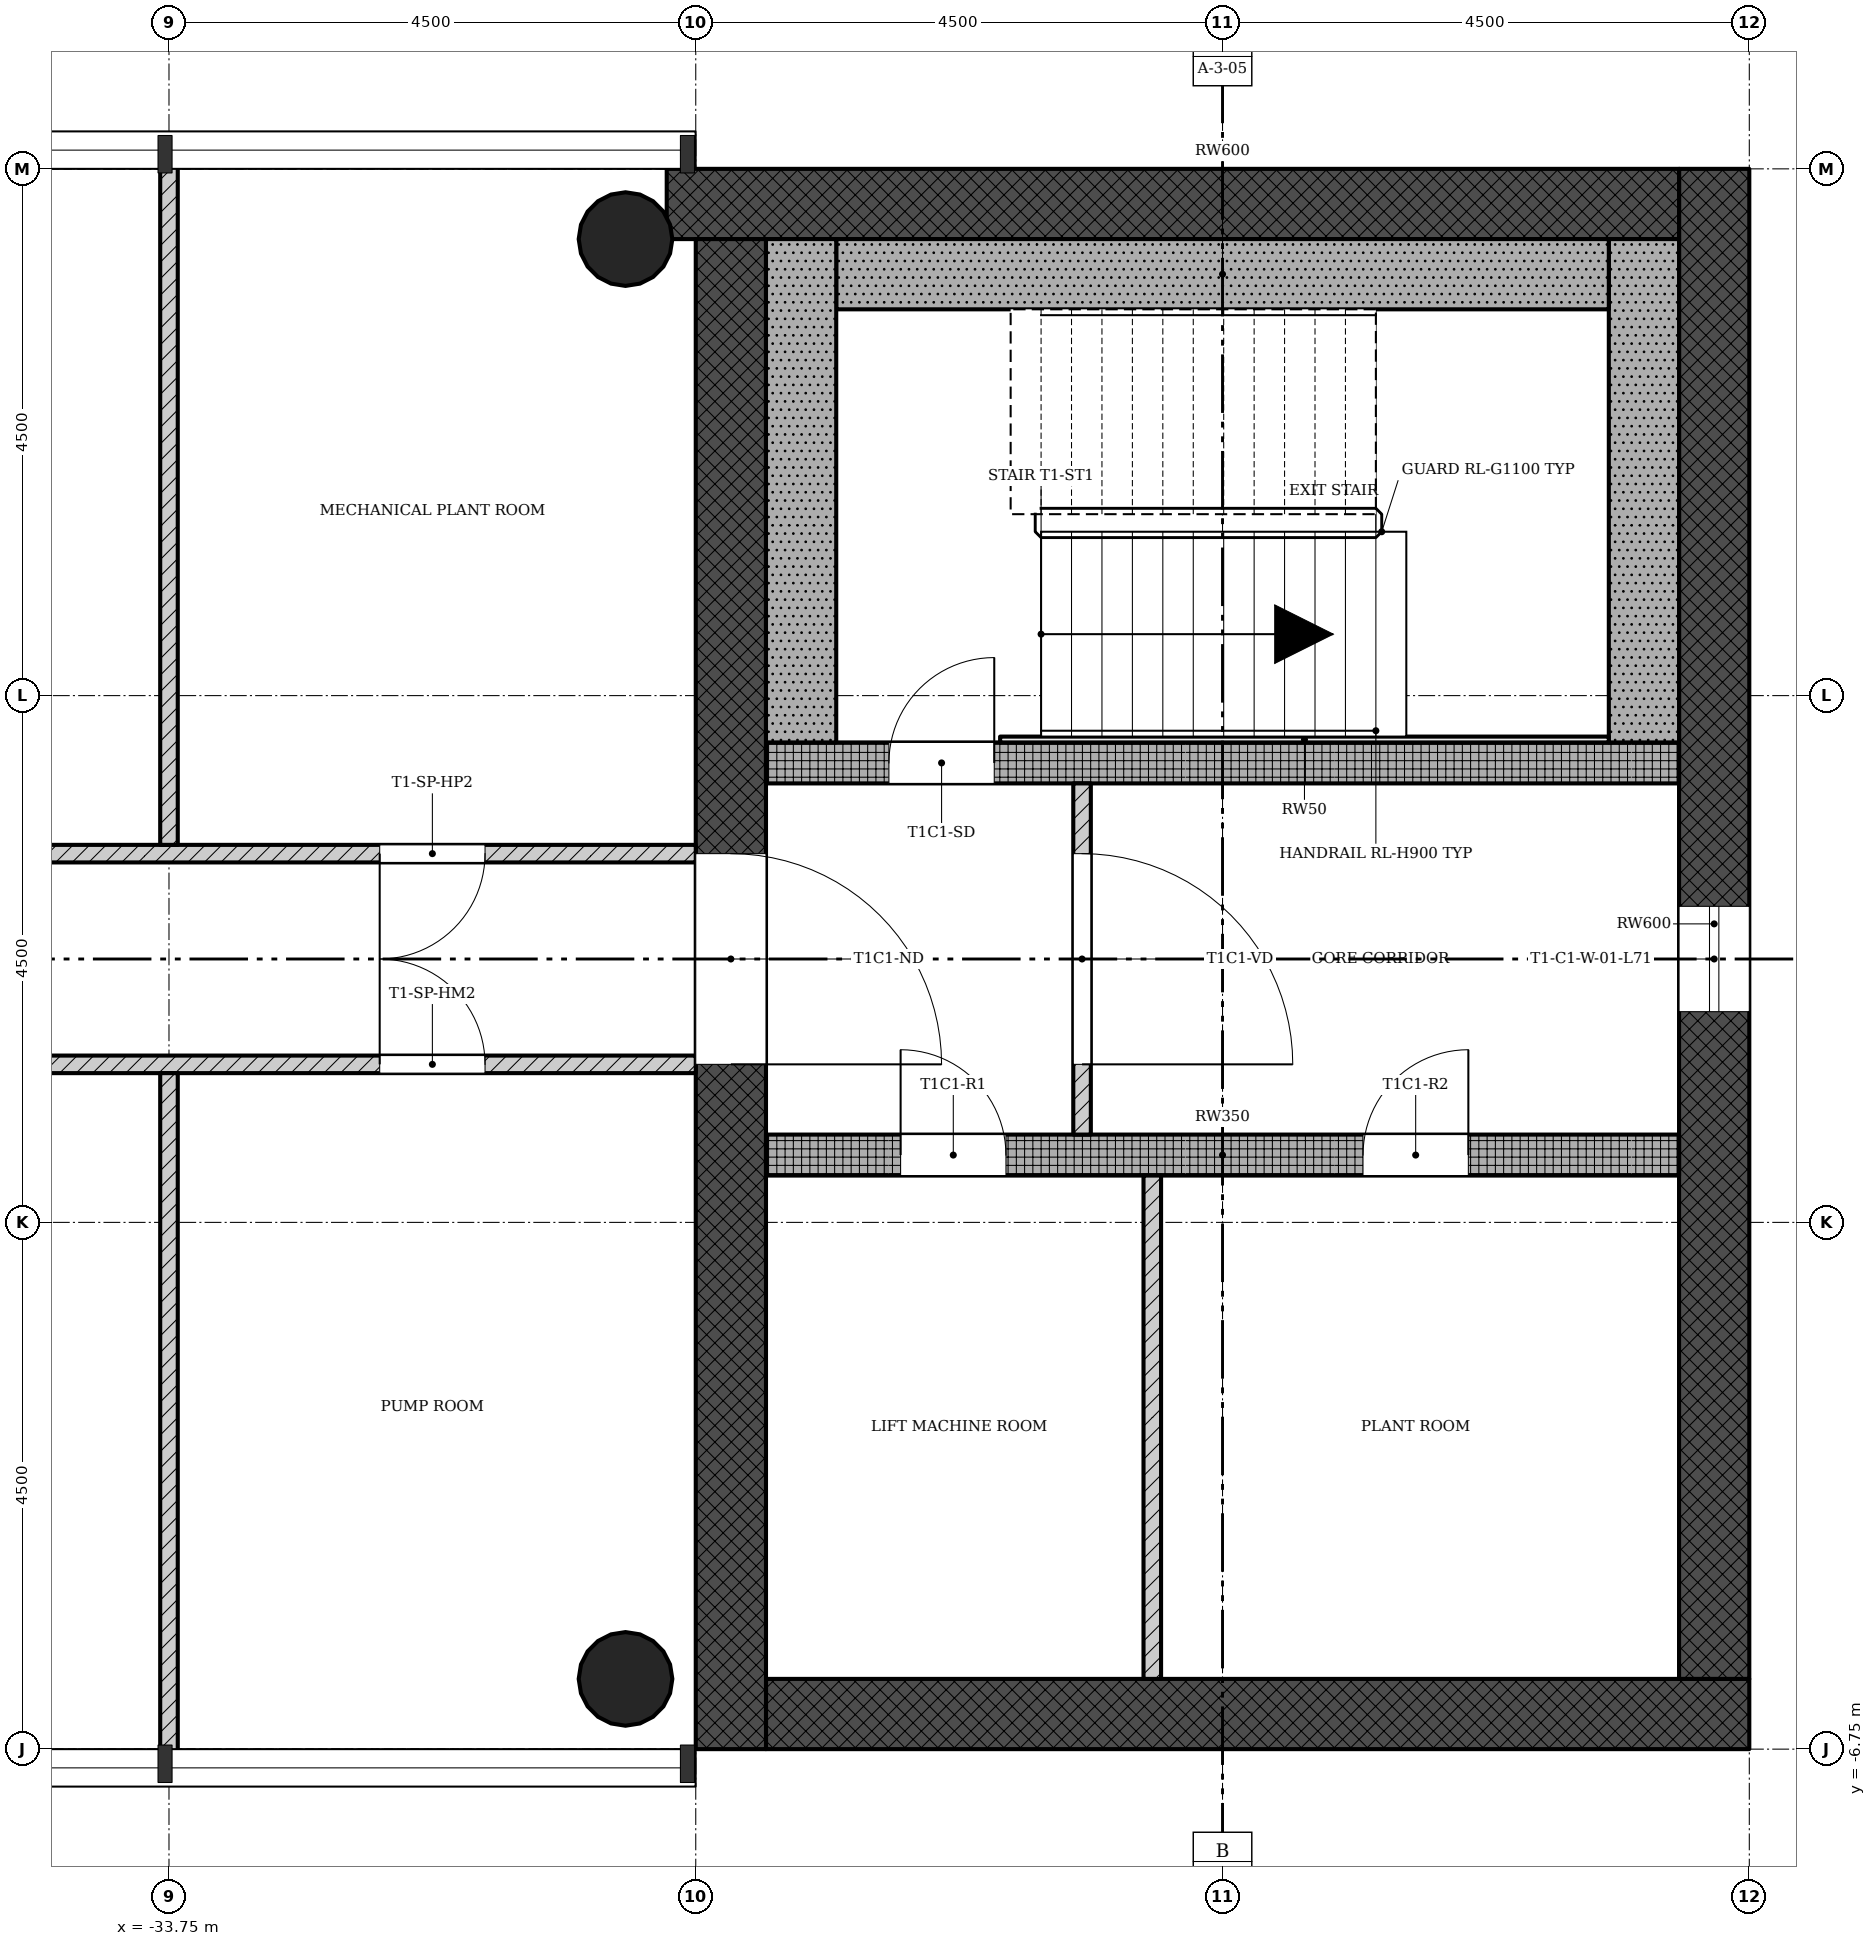
"""IFC4 building model, lengths in metres.
Left out: names, types, materials, properties, quantities, classifications, styles, units other than length and angle.
Written with IfcOpenShell. Run it as: python <this file> out.ifc"""

import sys

from ifc_helpers import new_model, si_unit, direction, frame, frame_2d, origin, origin_2d, place, context, subcontext, project, spatial, rectangle, hollow_circle, extrude, element, fill, save


model = new_model("IFC4")
c1 = context("Model", 3, precision=1e-05, world=origin(), true_north=direction((0.0, 1.0)))
c2 = subcontext(c1, "Body", "Model", "MODEL_VIEW")
j1 = project(units=[si_unit("LENGTHUNIT", "METRE"), si_unit("PLANEANGLEUNIT", "RADIAN")], contexts=[c1])
p1 = place(None, origin())
s1 = spatial("IfcSite", under=j1, at=p1, CompositionType="ELEMENT")
p2 = place(p1, origin())
s2 = spatial("IfcBuilding", under=s1, at=p2, CompositionType="ELEMENT")
p3 = place(p2, frame((0.0, 0.0, 260.4)))
s3 = spatial("IfcBuildingStorey", under=s2, at=p3, CompositionType="ELEMENT", Elevation=260.4)
p4 = place(p3, frame((-28.65, -6.45, 0.0), z_axis=(0.0, 0.0, 1.0), x_axis=(1.0, 0.0, 0.0)))
e1 = element("IfcWall", 1, at=p4, inside=s3, PredefinedType="SHEAR", context=c2, shape_type="SweptSolid", body=[
    extrude(rectangle(XDim=8.4, YDim=0.6, at=frame_2d((4.2, 0.0))), origin(), (0.0, 0.0, 1.0), 4.5),
])
p5 = place(p3, frame((-20.55, -6.15, 0.0), z_axis=(0.0, 0.0, 1.0), x_axis=(0.0, 1.0, 0.0)))
e2 = element("IfcWall", 2, at=p5, inside=s3, PredefinedType="SHEAR", context=c2, shape_type="SweptSolid", body=[
    extrude(rectangle(XDim=12.9, YDim=0.6, at=frame_2d((6.45, 0.0))), origin(), (0.0, 0.0, 1.0), 4.5),
])
p6 = place(p5, frame((5.7, 0.0, 0.45)))
e3 = element("IfcOpeningElement", 3, at=p6, cuts=e2, PredefinedType="OPENING", context=c2, shape_type="SweptSolid", body=[
    extrude(rectangle(XDim=0.9, YDim=2.4, at=frame_2d((0.45, 1.2))), frame((0.0, 0.31, 0.0), z_axis=(0.0, -1.0, 0.0), x_axis=(1.0, 0.0, 0.0)), (0.0, 0.0, 1.0), 0.62),
])
p7 = place(p3, frame((-20.85, 6.45, 0.0), z_axis=(0.0, 0.0, 1.0), x_axis=(-1.0, 0.0, 0.0)))
e4 = element("IfcWall", 4, at=p7, inside=s3, PredefinedType="SHEAR", context=c2, shape_type="SweptSolid", body=[
    extrude(rectangle(XDim=8.648, YDim=0.6, at=frame_2d((4.324, 0.0))), origin(), (0.0, 0.0, 1.0), 4.5),
])
p8 = place(p3, frame((-28.95, 6.15, 0.0), z_axis=(0.0, 0.0, 1.0), x_axis=(0.0, -1.0, 0.0)))
e5 = element("IfcWall", 5, at=p8, inside=s3, PredefinedType="SHEAR", context=c2, shape_type="SweptSolid", body=[
    extrude(rectangle(XDim=12.9, YDim=0.6, at=frame_2d((6.45, 0.0))), origin(), (0.0, 0.0, 1.0), 4.5),
])
p9 = place(p8, frame((5.25, 0.0, 0.0)))
e6 = element("IfcOpeningElement", 6, at=p9, cuts=e5, PredefinedType="OPENING", context=c2, shape_type="SweptSolid", body=[
    extrude(rectangle(XDim=1.8, YDim=2.1, at=frame_2d((0.9, 1.05))), frame((0.0, 0.31, 0.0), z_axis=(0.0, -1.0, 0.0), x_axis=(1.0, 0.0, 0.0)), (0.0, 0.0, 1.0), 0.62),
])
p10 = place(p3, frame((-28.65, -1.675, 0.0), z_axis=(0.0, 0.0, 1.0), x_axis=(1.0, 0.0, 0.0)))
e7 = element("IfcWall", 7, at=p10, inside=s3, PredefinedType="SHEAR", context=c2, shape_type="SweptSolid", body=[
    extrude(rectangle(XDim=7.8, YDim=0.35, at=frame_2d((3.9, 0.0))), origin(), (0.0, 0.0, 1.0), 4.5),
])
p11 = place(p10, frame((1.15, 0.0, 0.0)))
e8 = element("IfcOpeningElement", 8, at=p11, cuts=e7, PredefinedType="OPENING", context=c2, shape_type="SweptSolid", body=[
    extrude(rectangle(XDim=0.9, YDim=2.1, at=frame_2d((0.45, 1.05))), frame((0.0, 0.185, 0.0), z_axis=(0.0, -1.0, 0.0), x_axis=(1.0, 0.0, 0.0)), (0.0, 0.0, 1.0), 0.37),
])
p12 = place(p10, frame((5.1, 0.0, 0.0)))
e9 = element("IfcOpeningElement", 9, at=p12, cuts=e7, PredefinedType="OPENING", context=c2, shape_type="SweptSolid", body=[
    extrude(rectangle(XDim=0.9, YDim=2.1, at=frame_2d((0.45, 1.05))), frame((0.0, 0.185, 0.0), z_axis=(0.0, -1.0, 0.0), x_axis=(1.0, 0.0, 0.0)), (0.0, 0.0, 1.0), 0.37),
])
p13 = place(p3, frame((-28.65, 1.675, 0.0), z_axis=(0.0, 0.0, 1.0), x_axis=(1.0, 0.0, 0.0)))
e10 = element("IfcWall", 10, at=p13, inside=s3, PredefinedType="SHEAR", context=c2, shape_type="SweptSolid", body=[
    extrude(rectangle(XDim=7.8, YDim=0.35, at=frame_2d((3.9, 0.0))), origin(), (0.0, 0.0, 1.0), 4.5),
])
p14 = place(p13, frame((1.05, 0.0, 0.0)))
e11 = element("IfcOpeningElement", 11, at=p14, cuts=e10, PredefinedType="OPENING", context=c2, shape_type="SweptSolid", body=[
    extrude(rectangle(XDim=0.9, YDim=2.1, at=frame_2d((0.45, 1.05))), frame((0.0, 0.185, 0.0), z_axis=(0.0, -1.0, 0.0), x_axis=(1.0, 0.0, 0.0)), (0.0, 0.0, 1.0), 0.37),
])
for number, where, z_axis, x_axis in (
    (12, (-29.85, -6.15, 0.0), (0.0, 0.0, 1.0), (1.0, 0.0, 0.0)),
    (13, (-29.85, 6.15, 0.0), (0.0, 0.0, 1.0), (1.0, 0.0, 0.0)),
):
    element("IfcColumn", number, at=place(p3, frame(where, z_axis=z_axis, x_axis=x_axis)), inside=s3, PredefinedType="COLUMN", context=c2, shape_type="SweptSolid", body=[
        extrude(hollow_circle(Radius=0.4, WallThickness=0.028, at=origin_2d()), origin(), (0.0, 0.0, 1.0), 4.5),
    ])
p15 = place(p3, frame((-25.95, -1.5, 0.0), z_axis=(0.0, 0.0, 1.0), x_axis=(0.0, 1.0, 0.0)))
e14 = element("IfcWall", 14, at=p15, inside=s3, PredefinedType="PARTITIONING", context=c2, shape_type="SweptSolid", body=[
    extrude(rectangle(XDim=3.0, YDim=0.15, at=frame_2d((1.5, 0.0))), origin(), (0.0, 0.0, 1.0), 4.09),
])
p16 = place(p15, frame((0.6, 0.0, 0.0)))
e15 = element("IfcOpeningElement", 15, at=p16, cuts=e14, PredefinedType="OPENING", context=c2, shape_type="SweptSolid", body=[
    extrude(rectangle(XDim=1.8, YDim=2.1, at=frame_2d((0.9, 1.05))), frame((0.0, 0.085, 0.0), z_axis=(0.0, -1.0, 0.0), x_axis=(1.0, 0.0, 0.0)), (0.0, 0.0, 1.0), 0.17),
])
p17 = place(p3, frame((-25.35, -6.15, 0.0), z_axis=(0.0, 0.0, 1.0), x_axis=(0.0, 1.0, 0.0)))
e16 = element("IfcWall", 16, at=p17, inside=s3, PredefinedType="PARTITIONING", context=c2, shape_type="SweptSolid", body=[
    extrude(rectangle(XDim=4.3, YDim=0.15, at=frame_2d((2.15, 0.0))), origin(), (0.0, 0.0, 1.0), 4.09),
])
p18 = place(p3, frame((-42.75, 0.9, 0.0), z_axis=(0.0, 0.0, 1.0), x_axis=(1.0, 0.0, 0.0)))
e17 = element("IfcWall", 17, at=p18, inside=s3, PredefinedType="PARTITIONING", context=c2, shape_type="SweptSolid", body=[
    extrude(rectangle(XDim=13.5, YDim=0.15, at=frame_2d((6.75, 0.0))), origin(), (0.0, 0.0, 1.0), 4.09),
])
p19 = place(p18, frame((4.05, 0.0, 0.0)))
e18 = element("IfcOpeningElement", 18, at=p19, cuts=e17, PredefinedType="OPENING", context=c2, shape_type="SweptSolid", body=[
    extrude(rectangle(XDim=0.9, YDim=2.1, at=frame_2d((0.45, 1.05))), frame((0.0, 0.085, 0.0), z_axis=(0.0, -1.0, 0.0), x_axis=(1.0, 0.0, 0.0)), (0.0, 0.0, 1.0), 0.17),
])
p20 = place(p18, frame((10.8, 0.0, 0.0)))
e19 = element("IfcOpeningElement", 19, at=p20, cuts=e17, PredefinedType="OPENING", context=c2, shape_type="SweptSolid", body=[
    extrude(rectangle(XDim=0.9, YDim=2.1, at=frame_2d((0.45, 1.05))), frame((0.0, 0.085, 0.0), z_axis=(0.0, -1.0, 0.0), x_axis=(1.0, 0.0, 0.0)), (0.0, 0.0, 1.0), 0.17),
])
p21 = place(p3, frame((-33.75, 0.975, 0.0), z_axis=(0.0, 0.0, 1.0), x_axis=(0.0, 1.0, 0.0)))
e20 = element("IfcWall", 20, at=p21, inside=s3, PredefinedType="PARTITIONING", context=c2, shape_type="SweptSolid", body=[
    extrude(rectangle(XDim=5.875, YDim=0.15, at=frame_2d((2.938, 0.0))), origin(), (0.0, 0.0, 1.0), 4.09),
])
p22 = place(p3, frame((-42.75, -0.9, 0.0), z_axis=(0.0, 0.0, 1.0), x_axis=(1.0, 0.0, 0.0)))
e21 = element("IfcWall", 21, at=p22, inside=s3, PredefinedType="PARTITIONING", context=c2, shape_type="SweptSolid", body=[
    extrude(rectangle(XDim=13.5, YDim=0.15, at=frame_2d((6.75, 0.0))), origin(), (0.0, 0.0, 1.0), 4.09),
])
p23 = place(p22, frame((4.05, 0.0, 0.0)))
e22 = element("IfcOpeningElement", 22, at=p23, cuts=e21, PredefinedType="OPENING", context=c2, shape_type="SweptSolid", body=[
    extrude(rectangle(XDim=0.9, YDim=2.1, at=frame_2d((0.45, 1.05))), frame((0.0, 0.085, 0.0), z_axis=(0.0, -1.0, 0.0), x_axis=(1.0, 0.0, 0.0)), (0.0, 0.0, 1.0), 0.17),
])
p24 = place(p22, frame((10.8, 0.0, 0.0)))
e23 = element("IfcOpeningElement", 23, at=p24, cuts=e21, PredefinedType="OPENING", context=c2, shape_type="SweptSolid", body=[
    extrude(rectangle(XDim=0.9, YDim=2.1, at=frame_2d((0.45, 1.05))), frame((0.0, 0.085, 0.0), z_axis=(0.0, -1.0, 0.0), x_axis=(1.0, 0.0, 0.0)), (0.0, 0.0, 1.0), 0.17),
])
p25 = place(p3, frame((-33.75, -0.975, 0.0), z_axis=(0.0, 0.0, 1.0), x_axis=(0.0, -1.0, 0.0)))
e24 = element("IfcWall", 24, at=p25, inside=s3, PredefinedType="PARTITIONING", context=c2, shape_type="SweptSolid", body=[
    extrude(rectangle(XDim=5.875, YDim=0.15, at=frame_2d((2.938, 0.0))), origin(), (0.0, 0.0, 1.0), 4.09),
])
p26 = place(p3, frame((-21.15, 1.85, 0.0), z_axis=(0.0, 0.0, 1.0), x_axis=(0.0, 1.0, 0.0)))
e25 = element("IfcWall", 25, at=p26, inside=s3, PredefinedType="SHEAR", context=c2, shape_type="SweptSolid", body=[
    extrude(rectangle(XDim=4.3, YDim=0.6, at=frame_2d((2.15, 0.0))), origin(), (0.0, 0.0, 1.0), 4.5),
])
p27 = place(p3, frame((-28.05, 5.85, 0.0), z_axis=(0.0, 0.0, 1.0), x_axis=(1.0, 0.0, 0.0)))
e26 = element("IfcWall", 26, at=p27, inside=s3, PredefinedType="SHEAR", context=c2, shape_type="SweptSolid", body=[
    extrude(rectangle(XDim=6.6, YDim=0.6, at=frame_2d((3.3, 0.0))), origin(), (0.0, 0.0, 1.0), 4.5),
])
p28 = place(p3, frame((-28.35, 1.85, 0.0), z_axis=(0.0, 0.0, 1.0), x_axis=(0.0, 1.0, 0.0)))
e27 = element("IfcWall", 27, at=p28, inside=s3, PredefinedType="SHEAR", context=c2, shape_type="SweptSolid", body=[
    extrude(rectangle(XDim=4.3, YDim=0.6, at=frame_2d((2.15, 0.0))), origin(), (0.0, 0.0, 1.0), 4.5),
])
p29 = place(p3, frame((-26.65, 1.875, 0.0), z_axis=(0.0, 0.0, 1.0), x_axis=(1.0, 0.0, 0.0)))
e28 = element("IfcWall", 28, at=p29, inside=s3, PredefinedType="SHEAR", context=c2, shape_type="SweptSolid", body=[
    extrude(rectangle(XDim=5.2, YDim=0.05, at=frame_2d((2.6, 0.0))), origin(), (0.0, 0.0, 1.0), 4.5),
])
p30 = place(p6, origin())
e29 = element("IfcWindow", 29, at=p30, inside=s3, PartitioningType="SINGLE_PANEL", PredefinedType="WINDOW", context=c2, shape_type="SweptSolid", body=[
    extrude(rectangle(XDim=0.9, YDim=2.4, at=frame_2d((0.45, 1.2))), frame((0.0, 0.03, 0.0), z_axis=(0.0, -1.0, 0.0), x_axis=(1.0, 0.0, 0.0)), (0.0, 0.0, 1.0), 0.06),
])
fill(e3, e29)
p31 = place(p16, origin())
e30 = element("IfcDoor", 30, at=p31, inside=s3, OperationType="SINGLE_SWING_LEFT", PredefinedType="DOOR", context=c2, shape_type="SweptSolid", body=[
    extrude(rectangle(XDim=1.8, YDim=2.1, at=frame_2d((0.9, 1.05))), frame((0.0, 0.025, 0.0), z_axis=(0.0, -1.0, 0.0), x_axis=(1.0, 0.0, 0.0)), (0.0, 0.0, 1.0), 0.05),
])
fill(e15, e30)
p32 = place(p20, origin())
e31 = element("IfcDoor", 31, at=p32, inside=s3, OperationType="SINGLE_SWING_LEFT", PredefinedType="DOOR", context=c2, shape_type="SweptSolid", body=[
    extrude(rectangle(XDim=0.9, YDim=2.1, at=frame_2d((0.45, 1.05))), frame((0.0, 0.025, 0.0), z_axis=(0.0, -1.0, 0.0), x_axis=(1.0, 0.0, 0.0)), (0.0, 0.0, 1.0), 0.05),
])
fill(e19, e31)
p33 = place(p24, origin())
e32 = element("IfcDoor", 32, at=p33, inside=s3, OperationType="SINGLE_SWING_RIGHT", PredefinedType="DOOR", context=c2, shape_type="SweptSolid", body=[
    extrude(rectangle(XDim=0.9, YDim=2.1, at=frame_2d((0.45, 1.05))), frame((0.0, 0.025, 0.0), z_axis=(0.0, -1.0, 0.0), x_axis=(1.0, 0.0, 0.0)), (0.0, 0.0, 1.0), 0.05),
])
fill(e23, e32)
p34 = place(p14, origin())
e33 = element("IfcDoor", 33, at=p34, inside=s3, OperationType="SINGLE_SWING_LEFT", PredefinedType="DOOR", context=c2, shape_type="SweptSolid", body=[
    extrude(rectangle(XDim=0.9, YDim=2.1, at=frame_2d((0.45, 1.05))), frame((0.0, 0.025, 0.0), z_axis=(0.0, -1.0, 0.0), x_axis=(1.0, 0.0, 0.0)), (0.0, 0.0, 1.0), 0.05),
])
fill(e11, e33)
p35 = place(p11, origin())
e34 = element("IfcDoor", 34, at=p35, inside=s3, OperationType="SINGLE_SWING_RIGHT", PredefinedType="DOOR", context=c2, shape_type="SweptSolid", body=[
    extrude(rectangle(XDim=0.9, YDim=2.1, at=frame_2d((0.45, 1.05))), frame((0.0, 0.025, 0.0), z_axis=(0.0, -1.0, 0.0), x_axis=(1.0, 0.0, 0.0)), (0.0, 0.0, 1.0), 0.05),
])
fill(e8, e34)
p36 = place(p12, origin())
e35 = element("IfcDoor", 35, at=p36, inside=s3, OperationType="SINGLE_SWING_LEFT", PredefinedType="DOOR", context=c2, shape_type="SweptSolid", body=[
    extrude(rectangle(XDim=0.9, YDim=2.1, at=frame_2d((0.45, 1.05))), frame((0.0, 0.025, 0.0), z_axis=(0.0, -1.0, 0.0), x_axis=(1.0, 0.0, 0.0)), (0.0, 0.0, 1.0), 0.05),
])
fill(e9, e35)
p37 = place(p9, origin())
e36 = element("IfcDoor", 36, at=p37, inside=s3, OperationType="SINGLE_SWING_LEFT", PredefinedType="DOOR", context=c2, shape_type="SweptSolid", body=[
    extrude(rectangle(XDim=1.8, YDim=2.1, at=frame_2d((0.9, 1.05))), frame((0.0, 0.025, 0.0), z_axis=(0.0, -1.0, 0.0), x_axis=(1.0, 0.0, 0.0)), (0.0, 0.0, 1.0), 0.05),
])
fill(e6, e36)
save(model, sys.argv[1])
